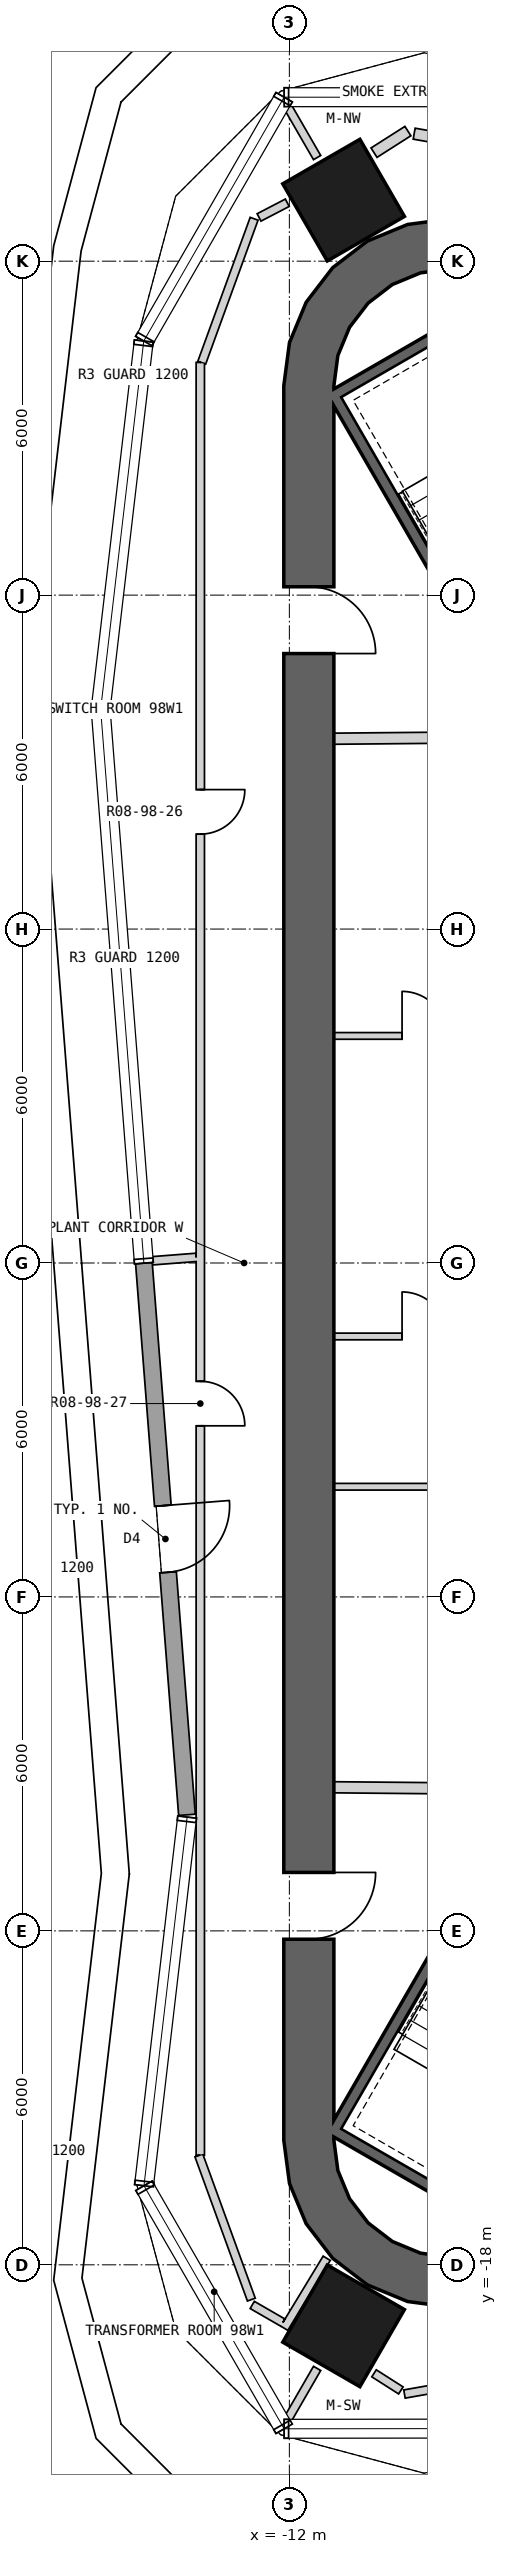
"""IFC4 building model, lengths in metres.
Left out: names, types, materials, properties, quantities, classifications, styles, units other than length and angle.
Written with IfcOpenShell. Run it as: python <this file> out.ifc"""

import sys

from ifc_helpers import new_model, si_unit, direction, frame, frame_2d, origin, origin_2d, place, context, subcontext, project, spatial, polyline, rectangle, outline, extrude, element, fill, save


model = new_model("IFC4")
c1 = context("Model", 3, precision=1e-05, world=origin(), true_north=direction((0.0, 1.0)))
c2 = subcontext(c1, "Body", "Model", "MODEL_VIEW")
j1 = project(units=[si_unit("LENGTHUNIT", "METRE"), si_unit("PLANEANGLEUNIT", "RADIAN")], contexts=[c1])
p1 = place(None, origin())
s1 = spatial("IfcSite", under=j1, at=p1, CompositionType="ELEMENT")
p2 = place(p1, origin())
s2 = spatial("IfcBuilding", under=s1, at=p2, CompositionType="ELEMENT")
p3 = place(p2, frame((0.0, 0.0, 435.3)))
s3 = spatial("IfcBuildingStorey", under=s2, at=p3, CompositionType="ELEMENT", Elevation=435.3)
for number, where, z_axis, x_axis in (
    (1, (-11.025, 19.097, 0.0), (0.0, 0.0, 1.0), (-0.5, 0.866, 0.0)),
    (2, (-11.025, -19.097, 0.0), (0.0, 0.0, 1.0), (-0.5, -0.866, 0.0)),
):
    element("IfcColumn", number, at=place(p3, frame(where, z_axis=z_axis, x_axis=x_axis)), inside=s3, PredefinedType="COLUMN", context=c2, shape_type="SweptSolid", body=[
        extrude(rectangle(XDim=1.6, YDim=1.6, at=origin_2d()), origin(), (0.0, 0.0, 1.0), 5.0),
    ])
p4 = place(p3, frame((-11.65, 15.762, 0.0), z_axis=(0.0, 0.0, 1.0), x_axis=(0.0, -1.0, 0.0)))
e3 = element("IfcWall", 3, at=p4, inside=s3, PredefinedType="SHEAR", context=c2, shape_type="SweptSolid", body=[
    extrude(rectangle(XDim=31.523, YDim=0.9, at=frame_2d((15.762, 0.0))), origin(), (0.0, 0.0, 1.0), 5.0),
])
p5 = place(p4, frame((3.612, 0.0, 0.0)))
e4 = element("IfcOpeningElement", 4, at=p5, cuts=e3, PredefinedType="OPENING", context=c2, shape_type="SweptSolid", body=[
    extrude(rectangle(XDim=1.2, YDim=2.4, at=frame_2d((0.6, 1.2))), frame((0.0, 0.46, 0.0), z_axis=(0.0, -1.0, 0.0), x_axis=(1.0, 0.0, 0.0)), (0.0, 0.0, 1.0), 0.92),
])
p6 = place(p4, frame((26.712, 0.0, 0.0)))
e5 = element("IfcOpeningElement", 5, at=p6, cuts=e3, PredefinedType="OPENING", context=c2, shape_type="SweptSolid", body=[
    extrude(rectangle(XDim=1.2, YDim=2.4, at=frame_2d((0.6, 1.2))), frame((0.0, 0.46, 0.0), z_axis=(0.0, -1.0, 0.0), x_axis=(1.0, 0.0, 0.0)), (0.0, 0.0, 1.0), 0.92),
])
p7 = place(p3, origin())
e6 = element("IfcWall", 6, at=p7, inside=s3, PredefinedType="SHEAR", context=c2, shape_type="SweptSolid", body=[
    extrude(outline(polyline([(-7.6, 18.36), (-8.323, 18.659), (-9.1, 18.762), (-9.876, 18.659), (-10.6, 18.36), (-11.221, 17.883), (-11.698, 17.262), (-11.998, 16.538), (-12.1, 15.762), (-11.2, 15.762), (-11.128, 16.305), (-10.919, 16.812), (-10.585, 17.247), (-10.15, 17.58), (-9.644, 17.79), (-9.1, 17.862), (-8.556, 17.79), (-8.05, 17.58), (-7.6, 18.36)])), origin(), (0.0, 0.0, 1.0), 5.0),
])
p8 = place(p3, origin())
e7 = element("IfcWall", 7, at=p8, inside=s3, PredefinedType="SHEAR", context=c2, shape_type="SweptSolid", body=[
    extrude(outline(polyline([(-12.1, -15.762), (-11.998, -16.538), (-11.698, -17.262), (-11.221, -17.883), (-10.6, -18.36), (-9.876, -18.659), (-9.1, -18.762), (-8.323, -18.659), (-7.6, -18.36), (-8.05, -17.58), (-8.556, -17.79), (-9.1, -17.862), (-9.644, -17.79), (-10.15, -17.58), (-10.585, -17.247), (-10.919, -16.812), (-11.128, -16.305), (-11.2, -15.762), (-12.1, -15.762)])), origin(), (0.0, 0.0, 1.0), 5.0),
])
p9 = place(p3, frame((-14.614, -0.002, 0.0), z_axis=(0.0, 0.0, 1.0), x_axis=(0.077860592968, -0.996964256161, 0.0)))
e8 = element("IfcWall", 8, at=p9, inside=s3, PredefinedType="SOLIDWALL", context=c2, shape_type="SweptSolid", body=[
    extrude(rectangle(XDim=9.943, YDim=0.3, at=frame_2d((4.972, 0.0))), origin(), (0.0, 0.0, 1.0), 4.75),
])
p10 = place(p9, frame((4.372, 0.0, 0.0)))
e9 = element("IfcOpeningElement", 9, at=p10, cuts=e8, PredefinedType="OPENING", context=c2, shape_type="SweptSolid", body=[
    extrude(rectangle(XDim=1.2, YDim=2.4, at=frame_2d((0.6, 1.2))), frame((0.0, 0.16, 0.0), z_axis=(0.0, -1.0, 0.0), x_axis=(1.0, 0.0, 0.0)), (0.0, 0.0, 1.0), 0.32),
])
p11 = place(p3, frame((-11.245, 15.678, -0.25), z_axis=(0.0, 0.0, 1.0), x_axis=(0.499977274689, -0.866038523851, 0.0)))
e10 = element("IfcWall", 10, at=p11, inside=s3, PredefinedType="SHEAR", context=c2, shape_type="SweptSolid", body=[
    extrude(rectangle(XDim=8.1, YDim=0.2, at=frame_2d((4.05, 0.0))), origin(), (0.0, 0.0, 1.0), 5.0),
])
for number, where, z_axis, x_axis in (
    (11, (-7.818, 17.541, -0.25), (0.0, 0.0, 1.0), (-0.866, -0.5, 0.0)),
    (12, (-11.282, -15.541, -0.25), (0.0, 0.0, 1.0), (0.866, -0.5, 0.0)),
):
    element("IfcWall", number, at=place(p3, frame(where, z_axis=z_axis, x_axis=x_axis)), inside=s3, PredefinedType="SHEAR", context=c2, shape_type="SweptSolid", body=[
        extrude(rectangle(XDim=3.8, YDim=0.2, at=frame_2d((1.9, 0.0))), origin(), (0.0, 0.0, 1.0), 5.0),
    ])
p12 = place(p3, frame((-7.196, -8.663, -0.25), z_axis=(0.0, 0.0, 1.0), x_axis=(-0.499997992926, -0.866026562566, 0.0)))
e13 = element("IfcWall", 13, at=p12, inside=s3, PredefinedType="SHEAR", context=c2, shape_type="SweptSolid", body=[
    extrude(rectangle(XDim=7.9, YDim=0.2, at=frame_2d((3.95, 0.0))), origin(), (0.0, 0.0, 1.0), 5.0),
])
p13 = place(p3, frame((-11.2, 4.08, 0.0), z_axis=(0.0, 0.0, 1.0), x_axis=(1.0, 0.0, 0.0)))
e14 = element("IfcWall", 14, at=p13, inside=s3, PredefinedType="PARTITIONING", context=c2, shape_type="SweptSolid", body=[
    extrude(rectangle(XDim=3.25, YDim=0.12, at=frame_2d((1.625, 0.0))), origin(), (0.0, 0.0, 1.0), 4.75),
])
p14 = place(p13, frame((1.225, 0.0, 0.0)))
e15 = element("IfcOpeningElement", 15, at=p14, cuts=e14, PredefinedType="OPENING", context=c2, shape_type="SweptSolid", body=[
    extrude(rectangle(XDim=0.8, YDim=2.1, at=frame_2d((0.4, 1.05))), frame((0.0, 0.07, 0.0), z_axis=(0.0, -1.0, 0.0), x_axis=(1.0, 0.0, 0.0)), (0.0, 0.0, 1.0), 0.14),
])
p15 = place(p3, frame((-7.85, 9.451, 0.0), z_axis=(0.0, 0.0, 1.0), x_axis=(-0.999957167047, -0.009255488683, 0.0)))
e16 = element("IfcWall", 16, at=p15, inside=s3, PredefinedType="PARTITIONING", context=c2, shape_type="SweptSolid", body=[
    extrude(rectangle(XDim=3.35, YDim=0.2, at=frame_2d((1.675, 0.0))), origin(), (0.0, 0.0, 1.0), 4.75),
])
p16 = place(p3, frame((-11.2, -1.32, 0.0), z_axis=(0.0, 0.0, 1.0), x_axis=(1.0, 0.0, 0.0)))
e17 = element("IfcWall", 17, at=p16, inside=s3, PredefinedType="PARTITIONING", context=c2, shape_type="SweptSolid", body=[
    extrude(rectangle(XDim=3.25, YDim=0.12, at=frame_2d((1.625, 0.0))), origin(), (0.0, 0.0, 1.0), 4.75),
])
p17 = place(p16, frame((1.225, 0.0, 0.0)))
e18 = element("IfcOpeningElement", 18, at=p17, cuts=e17, PredefinedType="OPENING", context=c2, shape_type="SweptSolid", body=[
    extrude(rectangle(XDim=0.8, YDim=2.1, at=frame_2d((0.4, 1.05))), frame((0.0, 0.07, 0.0), z_axis=(0.0, -1.0, 0.0), x_axis=(1.0, 0.0, 0.0)), (0.0, 0.0, 1.0), 0.14),
])
p18 = place(p3, frame((-7.95, -4.02, 0.0), z_axis=(0.0, 0.0, 1.0), x_axis=(-1.0, 0.0, 0.0)))
e19 = element("IfcWall", 19, at=p18, inside=s3, PredefinedType="PARTITIONING", context=c2, shape_type="SweptSolid", body=[
    extrude(rectangle(XDim=3.25, YDim=0.12, at=frame_2d((1.625, 0.0))), origin(), (0.0, 0.0, 1.0), 4.75),
])
p19 = place(p3, frame((-11.2, -9.42, 0.0), z_axis=(0.0, 0.0, 1.0), x_axis=(0.999957467379, -0.009222983926, 0.0)))
e20 = element("IfcWall", 20, at=p19, inside=s3, PredefinedType="PARTITIONING", context=c2, shape_type="SweptSolid", body=[
    extrude(rectangle(XDim=3.15, YDim=0.2, at=frame_2d((1.575, 0.0))), origin(), (0.0, 0.0, 1.0), 4.75),
])
p20 = place(p3, frame((-13.6, 16.18, 0.0), z_axis=(0.0, 0.0, 1.0), x_axis=(0.0, -1.0, 0.0)))
e21 = element("IfcWall", 21, at=p20, inside=s3, PredefinedType="PLUMBINGWALL", context=c2, shape_type="SweptSolid", body=[
    extrude(rectangle(XDim=16.063, YDim=0.15, at=frame_2d((8.032, 0.0))), origin(), (0.0, 0.0, 1.0), 4.75),
])
p21 = place(p20, frame((7.675, 0.0, 0.0)))
e22 = element("IfcOpeningElement", 22, at=p21, cuts=e21, PredefinedType="OPENING", context=c2, shape_type="SweptSolid", body=[
    extrude(rectangle(XDim=0.8, YDim=2.1, at=frame_2d((0.4, 1.05))), frame((0.0, 0.085, 0.0), z_axis=(0.0, -1.0, 0.0), x_axis=(1.0, 0.0, 0.0)), (0.0, 0.0, 1.0), 0.17),
])
p22 = place(p3, frame((-13.6, 0.117, 0.0), z_axis=(0.0, 0.0, 1.0), x_axis=(0.0, -1.0, 0.0)))
e23 = element("IfcWall", 23, at=p22, inside=s3, PredefinedType="PLUMBINGWALL", context=c2, shape_type="SweptSolid", body=[
    extrude(rectangle(XDim=16.148, YDim=0.15, at=frame_2d((8.074, 0.0))), origin(), (0.0, 0.0, 1.0), 4.75),
])
p23 = place(p22, frame((2.243, 0.0, 0.0)))
e24 = element("IfcOpeningElement", 24, at=p23, cuts=e23, PredefinedType="OPENING", context=c2, shape_type="SweptSolid", body=[
    extrude(rectangle(XDim=0.8, YDim=2.1, at=frame_2d((0.4, 1.05))), frame((0.0, 0.085, 0.0), z_axis=(0.0, -1.0, 0.0), x_axis=(1.0, 0.0, 0.0)), (0.0, 0.0, 1.0), 0.17),
])
p24 = place(p3, frame((-12.633, 18.762, 0.0), z_axis=(0.0, 0.0, 1.0), x_axis=(-0.342084949285, -0.939669030815, 0.0)))
e25 = element("IfcWall", 25, at=p24, inside=s3, PredefinedType="PLUMBINGWALL", context=c2, shape_type="SweptSolid", body=[
    extrude(rectangle(XDim=2.752, YDim=0.15, at=frame_2d((1.376, 0.0))), origin(), (0.0, 0.0, 1.0), 4.75),
])
p25 = place(p3, frame((-12.038, 19.05, 0.0), z_axis=(0.0, 0.0, 1.0), x_axis=(-0.887223795035, -0.461339286778, 0.0)))
e26 = element("IfcWall", 26, at=p25, inside=s3, PredefinedType="PLUMBINGWALL", context=c2, shape_type="SweptSolid", body=[
    extrude(rectangle(XDim=0.572, YDim=0.15, at=frame_2d((0.286, 0.0))), origin(), (0.0, 0.0, 1.0), 4.75),
])
p26 = place(p3, frame((-12.091, -19.14, 0.0), z_axis=(0.0, 0.0, 1.0), x_axis=(0.518518801369, 0.855066227041, 0.0)))
e27 = element("IfcWall", 27, at=p26, inside=s3, PredefinedType="PLUMBINGWALL", context=c2, shape_type="SweptSolid", body=[
    extrude(rectangle(XDim=1.47, YDim=0.15, at=frame_2d((0.735, 0.0))), origin(), (0.0, 0.0, 1.0), 4.75),
])
p27 = place(p3, frame((-12.667, -18.721, 0.0), z_axis=(0.0, 0.0, 1.0), x_axis=(0.866031754707, -0.499988999718, 0.0)))
e28 = element("IfcWall", 28, at=p27, inside=s3, PredefinedType="PLUMBINGWALL", context=c2, shape_type="SweptSolid", body=[
    extrude(rectangle(XDim=0.634, YDim=0.15, at=frame_2d((0.317, 0.0))), origin(), (0.0, 0.0, 1.0), 4.75),
])
p28 = place(p3, frame((-13.626, -16.035, 0.0), z_axis=(0.0, 0.0, 1.0), x_axis=(0.342070181816, -0.939674406756, 0.0)))
e29 = element("IfcWall", 29, at=p28, inside=s3, PredefinedType="PLUMBINGWALL", context=c2, shape_type="SweptSolid", body=[
    extrude(rectangle(XDim=2.756, YDim=0.15, at=frame_2d((1.378, 0.0))), origin(), (0.0, 0.0, 1.0), 4.75),
])
p29 = place(p3, frame((-14.491, 0.037, 0.0), z_axis=(0.0, 0.0, 1.0), x_axis=(0.996989219139, 0.077540292245, 0.0)))
e30 = element("IfcWall", 30, at=p29, inside=s3, PredefinedType="PLUMBINGWALL", context=c2, shape_type="SweptSolid", body=[
    extrude(rectangle(XDim=0.819, YDim=0.15, at=frame_2d((0.409, 0.0))), origin(), (0.0, 0.0, 1.0), 4.75),
])
for number, where, z_axis, x_axis in (
    (31, (-11.501, 19.861, 0.0), (0.0, 0.0, 1.0), (-0.5, 0.866, 0.0)),
    (32, (-11.501, -19.861, 0.0), (0.0, 0.0, 1.0), (-0.5, -0.866, 0.0)),
):
    element("IfcWall", number, at=place(p3, frame(where, z_axis=z_axis, x_axis=x_axis)), inside=s3, PredefinedType="PLUMBINGWALL", context=c2, shape_type="SweptSolid", body=[
        extrude(rectangle(XDim=1.098, YDim=0.15, at=frame_2d((0.549, 0.0))), origin(), (0.0, 0.0, 1.0), 3.93),
    ])
p30 = place(p3, frame((-9.87, 20.337, 0.0), z_axis=(0.0, 0.0, 1.0), x_axis=(-0.843326891705, -0.537400924569, 0.0)))
e33 = element("IfcWall", 33, at=p30, inside=s3, PredefinedType="PARTITIONING", context=c2, shape_type="SweptSolid", body=[
    extrude(rectangle(XDim=0.721, YDim=0.2, at=frame_2d((0.361, 0.0))), origin(), (0.0, 0.0, 1.0), 4.75),
])
p31 = place(p3, frame((-7.246, 19.848, 0.0), z_axis=(0.0, 0.0, 1.0), x_axis=(-0.984816315713, 0.173599609177, 0.0)))
e34 = element("IfcWall", 34, at=p31, inside=s3, PredefinedType="PARTITIONING", context=c2, shape_type="SweptSolid", body=[
    extrude(rectangle(XDim=2.55, YDim=0.2, at=frame_2d((1.275, 0.0))), origin(), (0.0, 0.0, 1.0), 4.75),
])
p32 = place(p3, frame((-9.932, -20.322, 0.0), z_axis=(0.0, 0.0, 1.0), x_axis=(0.984813908974, 0.173613261856, 0.0)))
e35 = element("IfcWall", 35, at=p32, inside=s3, PredefinedType="PLUMBINGWALL", context=c2, shape_type="SweptSolid", body=[
    extrude(rectangle(XDim=2.752, YDim=0.15, at=frame_2d((1.376, 0.0))), origin(), (0.0, 0.0, 1.0), 4.75),
])
p33 = place(p3, frame((-10.479, -19.95, 0.0), z_axis=(0.0, 0.0, 1.0), x_axis=(0.843309487859, -0.537428234917, 0.0)))
e36 = element("IfcWall", 36, at=p33, inside=s3, PredefinedType="PLUMBINGWALL", context=c2, shape_type="SweptSolid", body=[
    extrude(rectangle(XDim=0.572, YDim=0.15, at=frame_2d((0.286, 0.0))), origin(), (0.0, 0.0, 1.0), 4.75),
])
p34 = place(p10, frame((1.2, 0.0, 0.0), z_axis=(0.0, 0.0, 1.0), x_axis=(-1.0, 0.0, 0.0)))
e37 = element("IfcDoor", 37, at=p34, inside=s3, OperationType="SINGLE_SWING_RIGHT", PredefinedType="DOOR", context=c2, shape_type="SweptSolid", body=[
    extrude(rectangle(XDim=1.2, YDim=2.4, at=frame_2d((0.6, 1.2))), frame((0.0, 0.025, 0.0), z_axis=(0.0, -1.0, 0.0), x_axis=(1.0, 0.0, 0.0)), (0.0, 0.0, 1.0), 0.05),
])
fill(e9, e37)
p35 = place(p17, origin())
e38 = element("IfcDoor", 38, at=p35, inside=s3, OperationType="SINGLE_SWING_LEFT", PredefinedType="USERDEFINED", context=c2, shape_type="SweptSolid", body=[
    extrude(rectangle(XDim=0.8, YDim=2.1, at=frame_2d((0.4, 1.05))), frame((0.0, 0.025, 0.0), z_axis=(0.0, -1.0, 0.0), x_axis=(1.0, 0.0, 0.0)), (0.0, 0.0, 1.0), 0.05),
])
fill(e18, e38)
p36 = place(p21, origin())
e39 = element("IfcDoor", 39, at=p36, inside=s3, OperationType="SINGLE_SWING_LEFT", PredefinedType="USERDEFINED", context=c2, shape_type="SweptSolid", body=[
    extrude(rectangle(XDim=0.8, YDim=2.1, at=frame_2d((0.4, 1.05))), frame((0.0, 0.025, 0.0), z_axis=(0.0, -1.0, 0.0), x_axis=(1.0, 0.0, 0.0)), (0.0, 0.0, 1.0), 0.05),
])
fill(e22, e39)
p37 = place(p23, origin())
e40 = element("IfcDoor", 40, at=p37, inside=s3, OperationType="SINGLE_SWING_RIGHT", PredefinedType="USERDEFINED", context=c2, shape_type="SweptSolid", body=[
    extrude(rectangle(XDim=0.8, YDim=2.1, at=frame_2d((0.4, 1.05))), frame((0.0, 0.025, 0.0), z_axis=(0.0, -1.0, 0.0), x_axis=(1.0, 0.0, 0.0)), (0.0, 0.0, 1.0), 0.05),
])
fill(e24, e40)
p38 = place(p14, origin())
e41 = element("IfcDoor", 41, at=p38, inside=s3, OperationType="SINGLE_SWING_LEFT", PredefinedType="USERDEFINED", context=c2, shape_type="SweptSolid", body=[
    extrude(rectangle(XDim=0.8, YDim=2.1, at=frame_2d((0.4, 1.05))), frame((0.0, 0.025, 0.0), z_axis=(0.0, -1.0, 0.0), x_axis=(1.0, 0.0, 0.0)), (0.0, 0.0, 1.0), 0.05),
])
fill(e15, e41)
p39 = place(p5, origin())
e42 = element("IfcDoor", 42, at=p39, inside=s3, OperationType="SINGLE_SWING_RIGHT", PredefinedType="USERDEFINED", context=c2, shape_type="SweptSolid", body=[
    extrude(rectangle(XDim=1.2, YDim=2.4, at=frame_2d((0.6, 1.2))), frame((0.0, 0.025, 0.0), z_axis=(0.0, -1.0, 0.0), x_axis=(1.0, 0.0, 0.0)), (0.0, 0.0, 1.0), 0.05),
])
fill(e4, e42)
p40 = place(p6, origin())
e43 = element("IfcDoor", 43, at=p40, inside=s3, OperationType="SINGLE_SWING_LEFT", PredefinedType="USERDEFINED", context=c2, shape_type="SweptSolid", body=[
    extrude(rectangle(XDim=1.2, YDim=2.4, at=frame_2d((0.6, 1.2))), frame((0.0, 0.025, 0.0), z_axis=(0.0, -1.0, 0.0), x_axis=(1.0, 0.0, 0.0)), (0.0, 0.0, 1.0), 0.05),
])
fill(e5, e43)
save(model, sys.argv[1])
